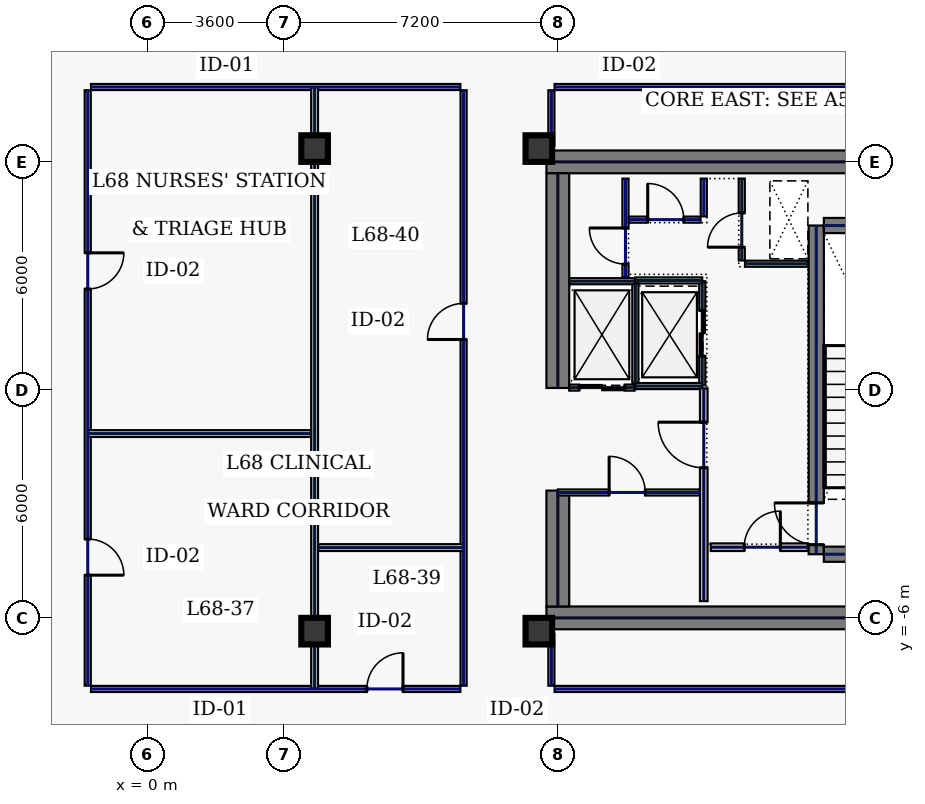
"""IFC4 building model, lengths in metres.
Left out: names, types, materials, properties, quantities, classifications, styles, units other than length and angle.
Written with IfcOpenShell. Run it as: python <this file> out.ifc"""

import sys

from ifc_helpers import new_model, si_unit, direction, frame, frame_2d, origin, origin_2d, place, context, subcontext, project, spatial, rectangle, hollow_rectangle, extrude, element, fill, save


model = new_model("IFC4")
c1 = context("Model", 3, precision=1e-05, world=origin(), true_north=direction((0.0, 1.0)))
c2 = subcontext(c1, "Body", "Model", "MODEL_VIEW")
j1 = project(units=[si_unit("LENGTHUNIT", "METRE"), si_unit("PLANEANGLEUNIT", "RADIAN")], contexts=[c1])
p1 = place(None, origin())
s1 = spatial("IfcSite", under=j1, at=p1, CompositionType="ELEMENT")
p2 = place(p1, origin())
s2 = spatial("IfcBuilding", under=s1, at=p2, CompositionType="ELEMENT")
p3 = place(p2, frame((0.0, 0.0, 293.0)))
s3 = spatial("IfcBuildingStorey", under=s2, at=p3, CompositionType="ELEMENT", Elevation=293.0)
for number, where, z_axis, x_axis in (
    (1, (10.5, 6.0, 0.0), (0.0, 0.0, 1.0), (1.0, 0.0, 0.0)),
    (2, (10.5, -6.0, 0.0), (0.0, 0.0, 1.0), (1.0, 0.0, 0.0)),
):
    element("IfcWall", number, at=place(p3, frame(where, z_axis=z_axis, x_axis=x_axis)), inside=s3, PredefinedType="SHEAR", context=c2, shape_type="SweptSolid", body=[
        extrude(rectangle(XDim=11.5, YDim=0.6, at=frame_2d((5.75, 0.0))), origin(), (0.0, 0.0, 1.0), 3.74),
    ])
p4 = place(p3, frame((10.8, -5.7, 0.0), z_axis=(0.0, 0.0, 1.0), x_axis=(0.0, 1.0, 0.0)))
e3 = element("IfcWall", 3, at=p4, inside=s3, PredefinedType="SHEAR", context=c2, shape_type="SweptSolid", body=[
    extrude(rectangle(XDim=3.05, YDim=0.6, at=frame_2d((1.525, 0.0))), origin(), (0.0, 0.0, 1.0), 3.74),
])
p5 = place(p3, frame((10.8, 0.05, 0.0), z_axis=(0.0, 0.0, 1.0), x_axis=(0.0, 1.0, 0.0)))
e4 = element("IfcWall", 4, at=p5, inside=s3, PredefinedType="SHEAR", context=c2, shape_type="SweptSolid", body=[
    extrude(rectangle(XDim=5.65, YDim=0.6, at=frame_2d((2.825, 0.0))), origin(), (0.0, 0.0, 1.0), 3.74),
])
p6 = place(p3, frame((17.6, -4.325, 0.0), z_axis=(0.0, 0.0, 1.0), x_axis=(0.0, 1.0, 0.0)))
e5 = element("IfcWall", 5, at=p6, inside=s3, PredefinedType="SHEAR", context=c2, shape_type="SweptSolid", body=[
    extrude(rectangle(XDim=8.65, YDim=0.4, at=frame_2d((4.325, 0.0))), origin(), (0.0, 0.0, 1.0), 3.74),
])
p7 = place(p6, frame((0.25, 0.0, 0.0)))
e6 = element("IfcOpeningElement", 6, at=p7, cuts=e5, PredefinedType="OPENING", context=c2, shape_type="SweptSolid", body=[
    extrude(rectangle(XDim=1.1, YDim=2.2, at=frame_2d((0.55, 1.1))), frame((0.0, 0.21, 0.0), z_axis=(0.0, -1.0, 0.0), x_axis=(1.0, 0.0, 0.0)), (0.0, 0.0, 1.0), 0.42),
])
for number, where, z_axis, x_axis in (
    (7, (17.8, -4.325, 0.0), (0.0, 0.0, 1.0), (1.0, 0.0, 0.0)),
    (8, (17.8, 4.325, 0.0), (0.0, 0.0, 1.0), (1.0, 0.0, 0.0)),
):
    element("IfcWall", number, at=place(p3, frame(where, z_axis=z_axis, x_axis=x_axis)), inside=s3, PredefinedType="SHEAR", context=c2, shape_type="SweptSolid", body=[
        extrude(rectangle(XDim=3.4, YDim=0.4, at=frame_2d((1.7, 0.0))), origin(), (0.0, 0.0, 1.0), 3.74),
    ])
for number, where, z_axis, x_axis in (
    (9, (10.3, -6.35, 0.0), (0.0, 0.0, 1.0), (1.0, 0.0, 0.0)),
    (10, (10.3, 6.35, 0.0), (0.0, 0.0, 1.0), (1.0, 0.0, 0.0)),
    (11, (4.4, -6.35, 0.0), (0.0, 0.0, 1.0), (1.0, 0.0, 0.0)),
    (12, (4.4, 6.35, 0.0), (0.0, 0.0, 1.0), (1.0, 0.0, 0.0)),
):
    element("IfcColumn", number, at=place(p3, frame(where, z_axis=z_axis, x_axis=x_axis)), inside=s3, PredefinedType="COLUMN", context=c2, shape_type="SweptSolid", body=[
        extrude(hollow_rectangle(XDim=0.7, YDim=0.7, WallThickness=0.032, at=origin_2d()), origin(), (0.0, 0.0, 1.0), 3.74),
    ])
p8 = place(p3, frame((14.6, 0.12, 0.0), z_axis=(0.0, 0.0, 1.0), x_axis=(0.0, 1.0, 0.0)))
e13 = element("IfcWall", 13, at=p8, inside=s3, PredefinedType="PARTITIONING", context=c2, shape_type="SweptSolid", body=[
    extrude(rectangle(XDim=2.74, YDim=0.16, at=frame_2d((1.37, 0.0))), origin(), (0.0, 0.0, 1.0), 3.74),
])
p9 = place(p8, frame((0.77, 0.0, 0.0)))
e14 = element("IfcOpeningElement", 14, at=p9, cuts=e13, PredefinedType="OPENING", context=c2, shape_type="SweptSolid", body=[
    extrude(rectangle(XDim=1.2, YDim=2.2, at=frame_2d((0.6, 1.1))), frame((0.0, 0.09, 0.0), z_axis=(0.0, -1.0, 0.0), x_axis=(1.0, 0.0, 0.0)), (0.0, 0.0, 1.0), 0.18),
])
for number, where, z_axis, x_axis in (
    (15, (12.84, 0.1, 0.0), (0.0, 0.0, 1.0), (1.0, 0.0, 0.0)),
    (16, (12.84, 2.88, 0.0), (0.0, 0.0, 1.0), (1.0, 0.0, 0.0)),
):
    element("IfcWall", number, at=place(p3, frame(where, z_axis=z_axis, x_axis=x_axis)), inside=s3, PredefinedType="PARTITIONING", context=c2, shape_type="SweptSolid", body=[
        extrude(rectangle(XDim=1.76, YDim=0.16, at=frame_2d((0.88, 0.0))), origin(), (0.0, 0.0, 1.0), 3.74),
    ])
p10 = place(p3, frame((12.84, 0.18, 0.0), z_axis=(0.0, 0.0, 1.0), x_axis=(0.0, 1.0, 0.0)))
e17 = element("IfcWall", 17, at=p10, inside=s3, PredefinedType="PARTITIONING", context=c2, shape_type="SweptSolid", body=[
    extrude(rectangle(XDim=2.62, YDim=0.16, at=frame_2d((1.31, 0.0))), origin(), (0.0, 0.0, 1.0), 3.74),
])
p11 = place(p3, frame((11.1, 0.06, 0.0), z_axis=(0.0, 0.0, 1.0), x_axis=(1.0, 0.0, 0.0)))
e18 = element("IfcWall", 18, at=p11, inside=s3, PredefinedType="PARTITIONING", context=c2, shape_type="SweptSolid", body=[
    extrude(rectangle(XDim=1.72, YDim=0.16, at=frame_2d((0.86, 0.0))), origin(), (0.0, 0.0, 1.0), 3.74),
])
p12 = place(p11, frame((0.26, 0.0, 0.0)))
e19 = element("IfcOpeningElement", 19, at=p12, cuts=e18, PredefinedType="OPENING", context=c2, shape_type="SweptSolid", body=[
    extrude(rectangle(XDim=1.2, YDim=2.2, at=frame_2d((0.6, 1.1))), frame((0.0, 0.09, 0.0), z_axis=(0.0, -1.0, 0.0), x_axis=(1.0, 0.0, 0.0)), (0.0, 0.0, 1.0), 0.18),
])
p13 = place(p3, frame((11.1, 2.86, 0.0), z_axis=(0.0, 0.0, 1.0), x_axis=(1.0, 0.0, 0.0)))
e20 = element("IfcWall", 20, at=p13, inside=s3, PredefinedType="PARTITIONING", context=c2, shape_type="SweptSolid", body=[
    extrude(rectangle(XDim=1.72, YDim=0.16, at=frame_2d((0.86, 0.0))), origin(), (0.0, 0.0, 1.0), 3.74),
])
p14 = place(p3, frame((15.64, 3.405, 0.0), z_axis=(0.0, 0.0, 1.0), x_axis=(0.0, 1.0, 0.0)))
e21 = element("IfcWall", 21, at=p14, inside=s3, PredefinedType="PARTITIONING", context=c2, shape_type="SweptSolid", body=[
    extrude(rectangle(XDim=2.155, YDim=0.16, at=frame_2d((1.078, 0.0))), origin(), (0.0, 0.0, 1.0), 3.74),
])
p15 = place(p14, frame((0.35, 0.0, 0.0)))
e22 = element("IfcOpeningElement", 22, at=p15, cuts=e21, PredefinedType="OPENING", context=c2, shape_type="SweptSolid", body=[
    extrude(rectangle(XDim=0.9, YDim=2.2, at=frame_2d((0.45, 1.1))), frame((0.0, 0.09, 0.0), z_axis=(0.0, -1.0, 0.0), x_axis=(1.0, 0.0, 0.0)), (0.0, 0.0, 1.0), 0.18),
])
p16 = place(p3, frame((15.725, 3.32, 0.0), z_axis=(0.0, 0.0, 1.0), x_axis=(1.0, 0.0, 0.0)))
e23 = element("IfcWall", 23, at=p16, inside=s3, PredefinedType="PARTITIONING", context=c2, shape_type="SweptSolid", body=[
    extrude(rectangle(XDim=1.655, YDim=0.16, at=frame_2d((0.827, 0.0))), origin(), (0.0, 0.0, 1.0), 3.74),
])
p17 = place(p3, frame((14.825, -4.14, 0.0), z_axis=(0.0, 0.0, 1.0), x_axis=(1.0, 0.0, 0.0)))
e24 = element("IfcWall", 24, at=p17, inside=s3, PredefinedType="SOLIDWALL", context=c2, shape_type="SweptSolid", body=[
    extrude(rectangle(XDim=2.555, YDim=0.2, at=frame_2d((1.277, 0.0))), origin(), (0.0, 0.0, 1.0), 3.74),
])
p18 = place(p17, frame((0.88, 0.0, 0.0)))
e25 = element("IfcOpeningElement", 25, at=p18, cuts=e24, PredefinedType="OPENING", context=c2, shape_type="SweptSolid", body=[
    extrude(rectangle(XDim=0.95, YDim=2.2, at=frame_2d((0.475, 1.1))), frame((0.0, 0.11, 0.0), z_axis=(0.0, -1.0, 0.0), x_axis=(1.0, 0.0, 0.0)), (0.0, 0.0, 1.0), 0.22),
])
p19 = place(p3, frame((10.8, -2.7, 0.0), z_axis=(0.0, 0.0, 1.0), x_axis=(1.0, 0.0, 0.0)))
e26 = element("IfcWall", 26, at=p19, inside=s3, PredefinedType="PARTITIONING", context=c2, shape_type="SweptSolid", body=[
    extrude(rectangle(XDim=3.735, YDim=0.16, at=frame_2d((1.867, 0.0))), origin(), (0.0, 0.0, 1.0), 3.74),
])
p20 = place(p19, frame((1.35, 0.0, 0.0)))
e27 = element("IfcOpeningElement", 27, at=p20, cuts=e26, PredefinedType="OPENING", context=c2, shape_type="SweptSolid", body=[
    extrude(rectangle(XDim=0.95, YDim=2.2, at=frame_2d((0.475, 1.1))), frame((0.0, 0.09, 0.0), z_axis=(0.0, -1.0, 0.0), x_axis=(1.0, 0.0, 0.0)), (0.0, 0.0, 1.0), 0.18),
])
p21 = place(p3, frame((12.58, 2.96, 0.0), z_axis=(0.0, 0.0, 1.0), x_axis=(0.0, 1.0, 0.0)))
e28 = element("IfcWall", 28, at=p21, inside=s3, PredefinedType="PARTITIONING", context=c2, shape_type="SweptSolid", body=[
    extrude(rectangle(XDim=2.6, YDim=0.16, at=frame_2d((1.3, 0.0))), origin(), (0.0, 0.0, 1.0), 3.74),
])
p22 = place(p21, frame((0.35, 0.0, 0.0)))
e29 = element("IfcOpeningElement", 29, at=p22, cuts=e28, PredefinedType="OPENING", context=c2, shape_type="SweptSolid", body=[
    extrude(rectangle(XDim=0.95, YDim=2.2, at=frame_2d((0.475, 1.1))), frame((0.0, 0.09, 0.0), z_axis=(0.0, -1.0, 0.0), x_axis=(1.0, 0.0, 0.0)), (0.0, 0.0, 1.0), 0.18),
])
p23 = place(p3, frame((12.665, 4.48, 0.0), z_axis=(0.0, 0.0, 1.0), x_axis=(1.0, 0.0, 0.0)))
e30 = element("IfcWall", 30, at=p23, inside=s3, PredefinedType="PARTITIONING", context=c2, shape_type="SweptSolid", body=[
    extrude(rectangle(XDim=1.89, YDim=0.16, at=frame_2d((0.945, 0.0))), origin(), (0.0, 0.0, 1.0), 3.74),
])
p24 = place(p23, frame((0.5, 0.0, 0.0)))
e31 = element("IfcOpeningElement", 31, at=p24, cuts=e30, PredefinedType="OPENING", context=c2, shape_type="SweptSolid", body=[
    extrude(rectangle(XDim=0.95, YDim=2.2, at=frame_2d((0.475, 1.1))), frame((0.0, 0.09, 0.0), z_axis=(0.0, -1.0, 0.0), x_axis=(1.0, 0.0, 0.0)), (0.0, 0.0, 1.0), 0.18),
])
p25 = place(p3, frame((14.64, 4.565, 0.0), z_axis=(0.0, 0.0, 1.0), x_axis=(0.0, 1.0, 0.0)))
e32 = element("IfcWall", 32, at=p25, inside=s3, PredefinedType="PARTITIONING", context=c2, shape_type="SweptSolid", body=[
    extrude(rectangle(XDim=0.995, YDim=0.16, at=frame_2d((0.498, 0.0))), origin(), (0.0, 0.0, 1.0), 3.74),
])
p26 = place(p3, frame((14.64, -5.56, 0.0), z_axis=(0.0, 0.0, 1.0), x_axis=(0.0, 1.0, 0.0)))
e33 = element("IfcWall", 33, at=p26, inside=s3, PredefinedType="SOLIDWALL", context=c2, shape_type="SweptSolid", body=[
    extrude(rectangle(XDim=5.6, YDim=0.2, at=frame_2d((2.8, 0.0))), origin(), (0.0, 0.0, 1.0), 3.74),
])
p27 = place(p26, frame((3.51, 0.0, 0.0)))
e34 = element("IfcOpeningElement", 34, at=p27, cuts=e33, PredefinedType="OPENING", context=c2, shape_type="SweptSolid", body=[
    extrude(rectangle(XDim=1.2, YDim=2.2, at=frame_2d((0.6, 1.1))), frame((0.0, 0.11, 0.0), z_axis=(0.0, -1.0, 0.0), x_axis=(1.0, 0.0, 0.0)), (0.0, 0.0, 1.0), 0.22),
])
p28 = place(p3, frame((21.915, 7.97, 0.0), z_axis=(0.0, 0.0, 1.0), x_axis=(-1.0, 0.0, 0.0)))
e35 = element("IfcWall", 35, at=p28, inside=s3, PredefinedType="PARTITIONING", context=c2, shape_type="SweptSolid", body=[
    extrude(rectangle(XDim=11.2, YDim=0.16, at=frame_2d((5.6, 0.0))), origin(), (0.0, 0.0, 1.0), 3.74),
])
p29 = place(p3, frame((10.63, 7.885, 0.0), z_axis=(0.0, 0.0, 1.0), x_axis=(0.0, -1.0, 0.0)))
e36 = element("IfcWall", 36, at=p29, inside=s3, PredefinedType="PARTITIONING", context=c2, shape_type="SweptSolid", body=[
    extrude(rectangle(XDim=1.465, YDim=0.16, at=frame_2d((0.732, 0.0))), origin(), (0.0, 0.0, 1.0), 3.74),
])
p30 = place(p3, frame((10.63, -6.42, 0.0), z_axis=(0.0, 0.0, 1.0), x_axis=(0.0, -1.0, 0.0)))
e37 = element("IfcWall", 37, at=p30, inside=s3, PredefinedType="PARTITIONING", context=c2, shape_type="SweptSolid", body=[
    extrude(rectangle(XDim=1.365, YDim=0.16, at=frame_2d((0.683, 0.0))), origin(), (0.0, 0.0, 1.0), 3.74),
])
p31 = place(p3, frame((10.715, -7.87, 0.0), z_axis=(0.0, 0.0, 1.0), x_axis=(1.0, 0.0, 0.0)))
e38 = element("IfcWall", 38, at=p31, inside=s3, PredefinedType="PARTITIONING", context=c2, shape_type="SweptSolid", body=[
    extrude(rectangle(XDim=11.2, YDim=0.16, at=frame_2d((5.6, 0.0))), origin(), (0.0, 0.0, 1.0), 3.74),
])
p32 = place(p3, frame((8.235, 7.97, 0.0), z_axis=(0.0, 0.0, 1.0), x_axis=(-1.0, 0.0, 0.0)))
e39 = element("IfcWall", 39, at=p32, inside=s3, PredefinedType="PARTITIONING", context=c2, shape_type="SweptSolid", body=[
    extrude(rectangle(XDim=9.72, YDim=0.16, at=frame_2d((4.86, 0.0))), origin(), (0.0, 0.0, 1.0), 3.74),
])
p33 = place(p3, frame((-1.57, 7.885, 0.0), z_axis=(0.0, 0.0, 1.0), x_axis=(0.0, -1.0, 0.0)))
e40 = element("IfcWall", 40, at=p33, inside=s3, PredefinedType="PARTITIONING", context=c2, shape_type="SweptSolid", body=[
    extrude(rectangle(XDim=15.67, YDim=0.16, at=frame_2d((7.835, 0.0))), origin(), (0.0, 0.0, 1.0), 3.74),
])
p34 = place(p33, frame((11.811, 0.0, 0.0)))
e41 = element("IfcOpeningElement", 41, at=p34, cuts=e40, PredefinedType="OPENING", context=c2, shape_type="SweptSolid", body=[
    extrude(rectangle(XDim=0.95, YDim=2.2, at=frame_2d((0.475, 1.1))), frame((0.0, 0.09, 0.0), z_axis=(0.0, -1.0, 0.0), x_axis=(1.0, 0.0, 0.0)), (0.0, 0.0, 1.0), 0.18),
])
p35 = place(p33, frame((4.279, 0.0, 0.0)))
e42 = element("IfcOpeningElement", 42, at=p35, cuts=e40, PredefinedType="OPENING", context=c2, shape_type="SweptSolid", body=[
    extrude(rectangle(XDim=0.95, YDim=2.2, at=frame_2d((0.475, 1.1))), frame((0.0, 0.09, 0.0), z_axis=(0.0, -1.0, 0.0), x_axis=(1.0, 0.0, 0.0)), (0.0, 0.0, 1.0), 0.18),
])
p36 = place(p3, frame((-1.485, -7.87, 0.0), z_axis=(0.0, 0.0, 1.0), x_axis=(1.0, 0.0, 0.0)))
e43 = element("IfcWall", 43, at=p36, inside=s3, PredefinedType="PARTITIONING", context=c2, shape_type="SweptSolid", body=[
    extrude(rectangle(XDim=9.72, YDim=0.16, at=frame_2d((4.86, 0.0))), origin(), (0.0, 0.0, 1.0), 3.74),
])
p37 = place(p36, frame((7.261, 0.0, 0.0)))
e44 = element("IfcOpeningElement", 44, at=p37, cuts=e43, PredefinedType="OPENING", context=c2, shape_type="SweptSolid", body=[
    extrude(rectangle(XDim=0.95, YDim=2.2, at=frame_2d((0.475, 1.1))), frame((0.0, 0.09, 0.0), z_axis=(0.0, -1.0, 0.0), x_axis=(1.0, 0.0, 0.0)), (0.0, 0.0, 1.0), 0.18),
])
p38 = place(p3, frame((8.32, -7.785, 0.0), z_axis=(0.0, 0.0, 1.0), x_axis=(0.0, 1.0, 0.0)))
e45 = element("IfcWall", 45, at=p38, inside=s3, PredefinedType="PARTITIONING", context=c2, shape_type="SweptSolid", body=[
    extrude(rectangle(XDim=15.67, YDim=0.16, at=frame_2d((7.835, 0.0))), origin(), (0.0, 0.0, 1.0), 3.74),
])
p39 = place(p38, frame((9.111, 0.0, 0.0)))
e46 = element("IfcOpeningElement", 46, at=p39, cuts=e45, PredefinedType="OPENING", context=c2, shape_type="SweptSolid", body=[
    extrude(rectangle(XDim=0.95, YDim=2.2, at=frame_2d((0.475, 1.1))), frame((0.0, 0.09, 0.0), z_axis=(0.0, -1.0, 0.0), x_axis=(1.0, 0.0, 0.0)), (0.0, 0.0, 1.0), 0.18),
])
p40 = place(p3, frame((4.4, -7.865, 0.0), z_axis=(0.0, 0.0, 1.0), x_axis=(0.0, 1.0, 0.0)))
e47 = element("IfcWall", 47, at=p40, inside=s3, PredefinedType="PARTITIONING", context=c2, shape_type="SweptSolid", body=[
    extrude(rectangle(XDim=15.83, YDim=0.18, at=frame_2d((7.915, 0.0))), origin(), (0.0, 0.0, 1.0), 3.035),
])
p41 = place(p3, frame((-1.565, -1.15, 0.0), z_axis=(0.0, 0.0, 1.0), x_axis=(1.0, 0.0, 0.0)))
e48 = element("IfcWall", 48, at=p41, inside=s3, PredefinedType="PARTITIONING", context=c2, shape_type="SweptSolid", body=[
    extrude(rectangle(XDim=5.87, YDim=0.18, at=frame_2d((2.935, 0.0))), origin(), (0.0, 0.0, 1.0), 3.74),
])
p42 = place(p3, frame((4.495, -4.15, 0.0), z_axis=(0.0, 0.0, 1.0), x_axis=(1.0, 0.0, 0.0)))
e49 = element("IfcWall", 49, at=p42, inside=s3, PredefinedType="PARTITIONING", context=c2, shape_type="SweptSolid", body=[
    extrude(rectangle(XDim=3.82, YDim=0.18, at=frame_2d((1.91, 0.0))), origin(), (0.0, 0.0, 1.0), 3.74),
])
p43 = place(p7, origin())
e50 = element("IfcDoor", 50, at=p43, inside=s3, OperationType="SINGLE_SWING_RIGHT", PredefinedType="DOOR", context=c2, shape_type="SweptSolid", body=[
    extrude(rectangle(XDim=1.1, YDim=2.2, at=frame_2d((0.55, 1.1))), frame((0.0, 0.025, 0.0), z_axis=(0.0, -1.0, 0.0), x_axis=(1.0, 0.0, 0.0)), (0.0, 0.0, 1.0), 0.05),
])
fill(e6, e50)
p44 = place(p9, origin())
e51 = element("IfcDoor", 51, at=p44, inside=s3, OperationType="SLIDING_TO_LEFT", PredefinedType="DOOR", context=c2, shape_type="SweptSolid", body=[
    extrude(rectangle(XDim=1.2, YDim=2.2, at=frame_2d((0.6, 1.1))), frame((0.0, 0.025, 0.0), z_axis=(0.0, -1.0, 0.0), x_axis=(1.0, 0.0, 0.0)), (0.0, 0.0, 1.0), 0.05),
])
fill(e14, e51)
p45 = place(p12, origin())
e52 = element("IfcDoor", 52, at=p45, inside=s3, OperationType="SLIDING_TO_LEFT", PredefinedType="DOOR", context=c2, shape_type="SweptSolid", body=[
    extrude(rectangle(XDim=1.2, YDim=2.2, at=frame_2d((0.6, 1.1))), frame((0.0, 0.025, 0.0), z_axis=(0.0, -1.0, 0.0), x_axis=(1.0, 0.0, 0.0)), (0.0, 0.0, 1.0), 0.05),
])
fill(e19, e52)
p46 = place(p15, origin())
e53 = element("IfcDoor", 53, at=p46, inside=s3, OperationType="SINGLE_SWING_LEFT", PredefinedType="DOOR", context=c2, shape_type="SweptSolid", body=[
    extrude(rectangle(XDim=0.9, YDim=2.2, at=frame_2d((0.45, 1.1))), frame((0.0, 0.025, 0.0), z_axis=(0.0, -1.0, 0.0), x_axis=(1.0, 0.0, 0.0)), (0.0, 0.0, 1.0), 0.05),
])
fill(e22, e53)
p47 = place(p18, origin())
e54 = element("IfcDoor", 54, at=p47, inside=s3, OperationType="SINGLE_SWING_RIGHT", PredefinedType="DOOR", context=c2, shape_type="SweptSolid", body=[
    extrude(rectangle(XDim=0.95, YDim=2.2, at=frame_2d((0.475, 1.1))), frame((0.0, 0.025, 0.0), z_axis=(0.0, -1.0, 0.0), x_axis=(1.0, 0.0, 0.0)), (0.0, 0.0, 1.0), 0.05),
])
fill(e25, e54)
p48 = place(p20, origin())
e55 = element("IfcDoor", 55, at=p48, inside=s3, OperationType="SINGLE_SWING_LEFT", PredefinedType="DOOR", context=c2, shape_type="SweptSolid", body=[
    extrude(rectangle(XDim=0.95, YDim=2.2, at=frame_2d((0.475, 1.1))), frame((0.0, 0.025, 0.0), z_axis=(0.0, -1.0, 0.0), x_axis=(1.0, 0.0, 0.0)), (0.0, 0.0, 1.0), 0.05),
])
fill(e27, e55)
p49 = place(p22, origin())
e56 = element("IfcDoor", 56, at=p49, inside=s3, OperationType="SINGLE_SWING_RIGHT", PredefinedType="DOOR", context=c2, shape_type="SweptSolid", body=[
    extrude(rectangle(XDim=0.95, YDim=2.2, at=frame_2d((0.475, 1.1))), frame((0.0, 0.025, 0.0), z_axis=(0.0, -1.0, 0.0), x_axis=(1.0, 0.0, 0.0)), (0.0, 0.0, 1.0), 0.05),
])
fill(e29, e56)
p50 = place(p24, origin())
e57 = element("IfcDoor", 57, at=p50, inside=s3, OperationType="SINGLE_SWING_LEFT", PredefinedType="DOOR", context=c2, shape_type="SweptSolid", body=[
    extrude(rectangle(XDim=0.95, YDim=2.2, at=frame_2d((0.475, 1.1))), frame((0.0, 0.025, 0.0), z_axis=(0.0, -1.0, 0.0), x_axis=(1.0, 0.0, 0.0)), (0.0, 0.0, 1.0), 0.05),
])
fill(e31, e57)
p51 = place(p27, origin())
e58 = element("IfcDoor", 58, at=p51, inside=s3, OperationType="SINGLE_SWING_RIGHT", PredefinedType="DOOR", context=c2, shape_type="SweptSolid", body=[
    extrude(rectangle(XDim=1.2, YDim=2.2, at=frame_2d((0.6, 1.1))), frame((0.0, 0.025, 0.0), z_axis=(0.0, -1.0, 0.0), x_axis=(1.0, 0.0, 0.0)), (0.0, 0.0, 1.0), 0.05),
])
fill(e34, e58)
p52 = place(p34, origin())
e59 = element("IfcDoor", 59, at=p52, inside=s3, OperationType="SINGLE_SWING_RIGHT", PredefinedType="DOOR", context=c2, shape_type="SweptSolid", body=[
    extrude(rectangle(XDim=0.95, YDim=2.2, at=frame_2d((0.475, 1.1))), frame((0.0, 0.025, 0.0), z_axis=(0.0, -1.0, 0.0), x_axis=(1.0, 0.0, 0.0)), (0.0, 0.0, 1.0), 0.05),
])
fill(e41, e59)
p53 = place(p35, origin())
e60 = element("IfcDoor", 60, at=p53, inside=s3, OperationType="SINGLE_SWING_LEFT", PredefinedType="DOOR", context=c2, shape_type="SweptSolid", body=[
    extrude(rectangle(XDim=0.95, YDim=2.2, at=frame_2d((0.475, 1.1))), frame((0.0, 0.025, 0.0), z_axis=(0.0, -1.0, 0.0), x_axis=(1.0, 0.0, 0.0)), (0.0, 0.0, 1.0), 0.05),
])
fill(e42, e60)
p54 = place(p37, origin())
e61 = element("IfcDoor", 61, at=p54, inside=s3, OperationType="SINGLE_SWING_RIGHT", PredefinedType="DOOR", context=c2, shape_type="SweptSolid", body=[
    extrude(rectangle(XDim=0.95, YDim=2.2, at=frame_2d((0.475, 1.1))), frame((0.0, 0.025, 0.0), z_axis=(0.0, -1.0, 0.0), x_axis=(1.0, 0.0, 0.0)), (0.0, 0.0, 1.0), 0.05),
])
fill(e44, e61)
p55 = place(p39, origin())
e62 = element("IfcDoor", 62, at=p55, inside=s3, OperationType="SINGLE_SWING_LEFT", PredefinedType="DOOR", context=c2, shape_type="SweptSolid", body=[
    extrude(rectangle(XDim=0.95, YDim=2.2, at=frame_2d((0.475, 1.1))), frame((0.0, 0.025, 0.0), z_axis=(0.0, -1.0, 0.0), x_axis=(1.0, 0.0, 0.0)), (0.0, 0.0, 1.0), 0.05),
])
fill(e46, e62)
save(model, sys.argv[1])
